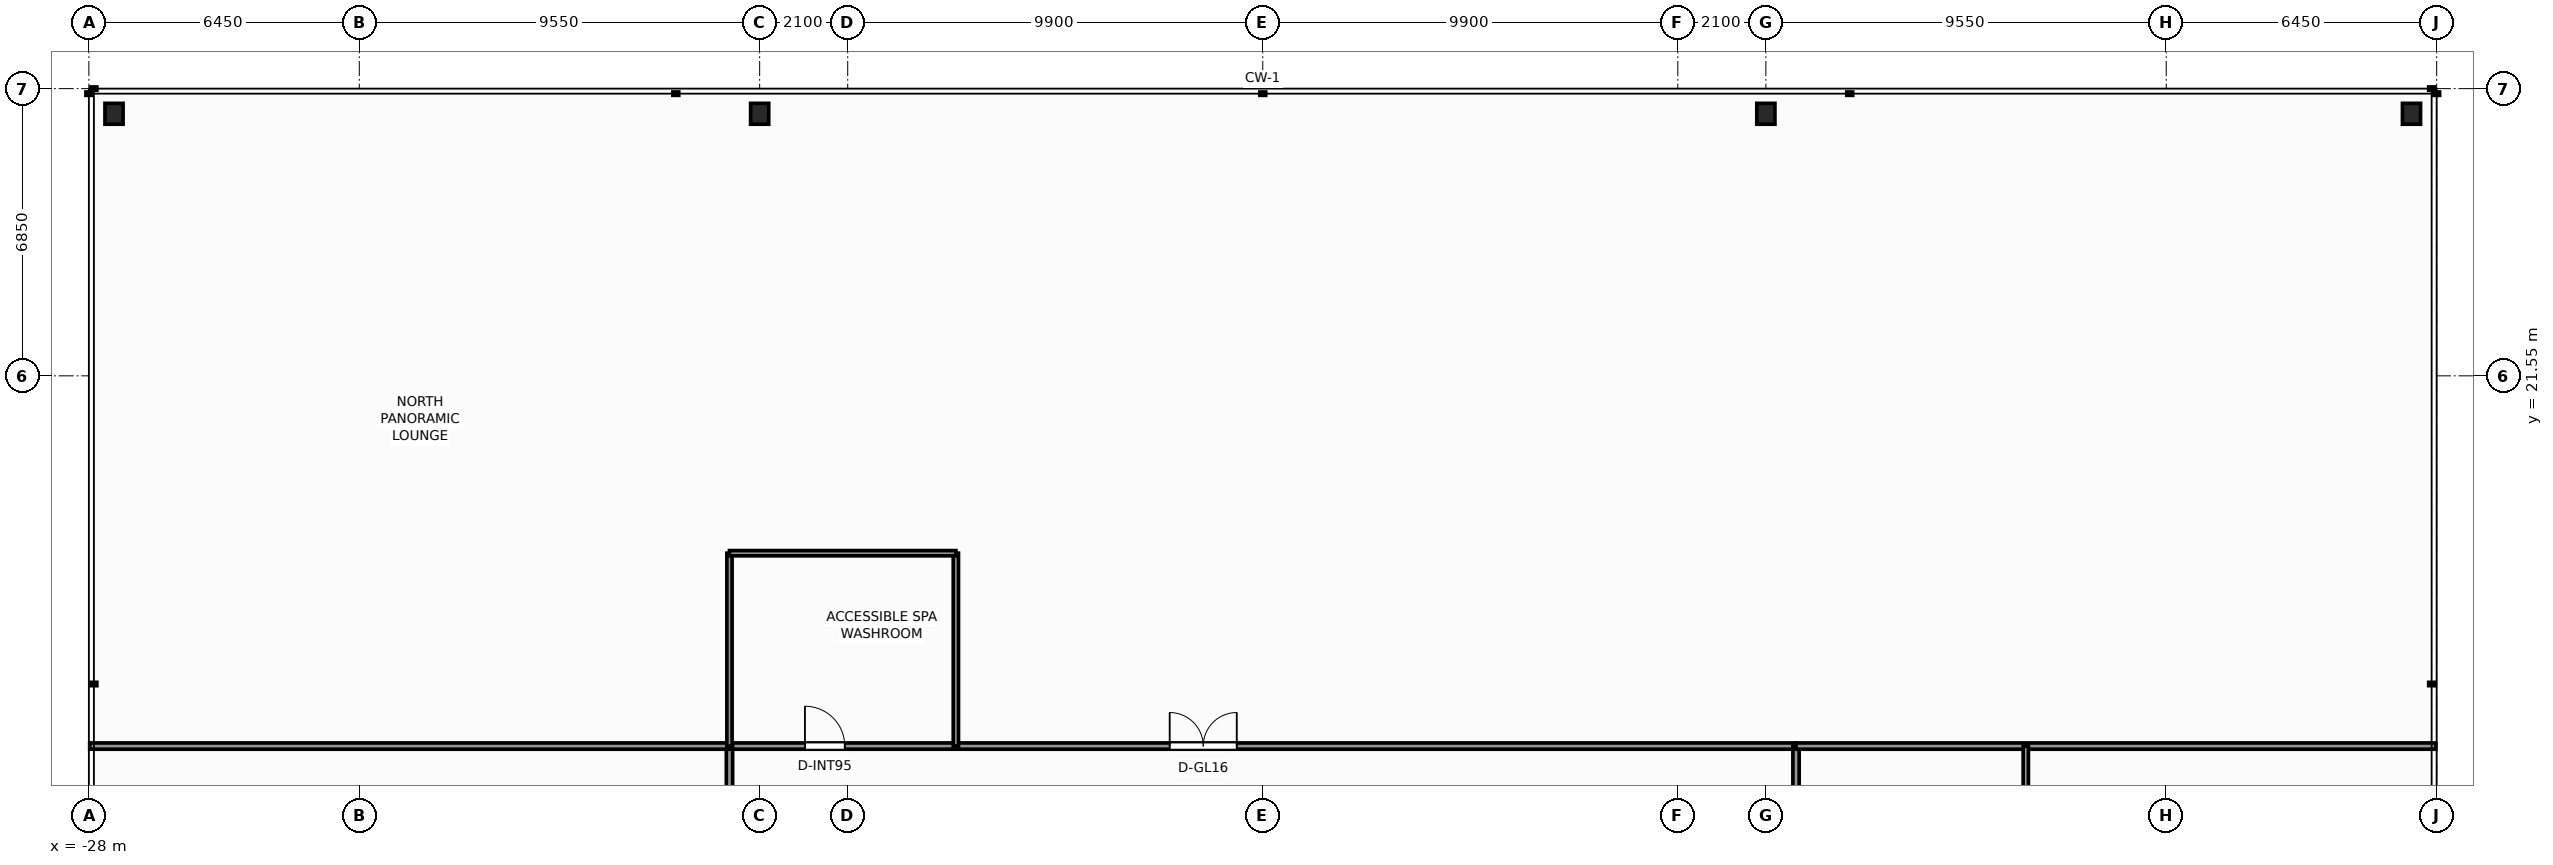
"""IFC4 building model, lengths in metres.
Left out: names, types, materials, properties, quantities, classifications, styles, units other than length and angle.
Written with IfcOpenShell. Run it as: python <this file> out.ifc"""

import sys

from ifc_helpers import new_model, si_unit, direction, frame, frame_2d, origin, origin_2d, place, context, subcontext, project, spatial, rectangle, i_section, extrude, element, fill, save


model = new_model("IFC4")
c1 = context("Model", 3, precision=1e-05, world=origin(), true_north=direction((0.0, 1.0)))
c2 = subcontext(c1, "Body", "Model", "MODEL_VIEW")
j1 = project(units=[si_unit("LENGTHUNIT", "METRE"), si_unit("PLANEANGLEUNIT", "RADIAN")], contexts=[c1])
p1 = place(None, origin())
s1 = spatial("IfcSite", under=j1, at=p1, CompositionType="ELEMENT")
p2 = place(p1, origin())
s2 = spatial("IfcBuilding", under=s1, at=p2, CompositionType="ELEMENT")
p3 = place(p2, frame((0.0, 0.0, 15.2)))
s3 = spatial("IfcBuildingStorey", under=s2, at=p3, CompositionType="ELEMENT", Elevation=15.2)
for number, where, z_axis, x_axis in (
    (1, (-27.4, 27.8, 0.0), (0.0, 0.0, 1.0), (1.0, 0.0, 0.0)),
    (2, (-12.0, 27.8, 0.0), (0.0, 0.0, 1.0), (1.0, 0.0, 0.0)),
    (3, (12.0, 27.8, 0.0), (0.0, 0.0, 1.0), (1.0, 0.0, 0.0)),
    (4, (27.4, 27.8, 0.0), (0.0, 0.0, 1.0), (1.0, 0.0, 0.0)),
):
    element("IfcColumn", number, at=place(p3, frame(where, z_axis=z_axis, x_axis=x_axis)), inside=s3, PredefinedType="COLUMN", context=c2, shape_type="SweptSolid", body=[
        extrude(i_section(OverallWidth=0.432, OverallDepth=0.498, WebThickness=0.056, FlangeThickness=0.089, FilletRadius=0.025, at=origin_2d()), origin(), (0.0, 0.0, 1.0), 4.1),
    ])
p4 = place(p3, frame((-12.72, 12.72, 0.0), z_axis=(0.0, 0.0, 1.0), x_axis=(1.0, 0.0, 0.0)))
e5 = element("IfcWall", 5, at=p4, inside=s3, PredefinedType="PARTITIONING", context=c2, shape_type="SweptSolid", body=[
    extrude(rectangle(XDim=25.44, YDim=0.15, at=frame_2d((12.72, 0.0))), origin(), (0.0, 0.0, 1.0), 2.674),
])
p5 = place(p4, frame((1.8, 0.0, 0.0)))
e6 = element("IfcOpeningElement", 6, at=p5, cuts=e5, PredefinedType="OPENING", context=c2, shape_type="SweptSolid", body=[
    extrude(rectangle(XDim=0.95, YDim=2.06, at=frame_2d((0.475, 1.03))), frame((0.0, 0.085, 0.0), z_axis=(0.0, -1.0, 0.0), x_axis=(1.0, 0.0, 0.0)), (0.0, 0.0, 1.0), 0.17),
])
p6 = place(p4, frame((10.5, 0.0, 0.0)))
e7 = element("IfcOpeningElement", 7, at=p6, cuts=e5, PredefinedType="OPENING", context=c2, shape_type="SweptSolid", body=[
    extrude(rectangle(XDim=1.6, YDim=2.3, at=frame_2d((0.8, 1.15))), frame((0.0, 0.085, 0.0), z_axis=(0.0, -1.0, 0.0), x_axis=(1.0, 0.0, 0.0)), (0.0, 0.0, 1.0), 0.17),
])
p7 = place(p3, frame((-12.72, 1.72, 0.0), z_axis=(0.0, 0.0, 1.0), x_axis=(0.0, 1.0, 0.0)))
e8 = element("IfcWall", 8, at=p7, inside=s3, PredefinedType="PARTITIONING", context=c2, shape_type="SweptSolid", body=[
    extrude(rectangle(XDim=11.0, YDim=0.15, at=frame_2d((5.5, 0.0))), origin(), (0.0, 0.0, 1.0), 2.674),
])
p8 = place(p7, frame((3.2, 0.0, 0.0)))
e9 = element("IfcOpeningElement", 9, at=p8, cuts=e8, PredefinedType="OPENING", context=c2, shape_type="SweptSolid", body=[
    extrude(rectangle(XDim=1.2, YDim=2.2, at=frame_2d((0.6, 1.1))), frame((0.0, 0.085, 0.0), z_axis=(0.0, -1.0, 0.0), x_axis=(1.0, 0.0, 0.0)), (0.0, 0.0, 1.0), 0.17),
])
p9 = place(p3, frame((12.72, 1.72, 0.0), z_axis=(0.0, 0.0, 1.0), x_axis=(0.0, 1.0, 0.0)))
e10 = element("IfcWall", 10, at=p9, inside=s3, PredefinedType="PARTITIONING", context=c2, shape_type="SweptSolid", body=[
    extrude(rectangle(XDim=11.0, YDim=0.15, at=frame_2d((5.5, 0.0))), origin(), (0.0, 0.0, 1.0), 2.674),
])
p10 = place(p9, frame((6.58, 0.0, 0.0)))
e11 = element("IfcOpeningElement", 11, at=p10, cuts=e10, PredefinedType="OPENING", context=c2, shape_type="SweptSolid", body=[
    extrude(rectangle(XDim=0.95, YDim=2.06, at=frame_2d((0.475, 1.03))), frame((0.0, 0.085, 0.0), z_axis=(0.0, -1.0, 0.0), x_axis=(1.0, 0.0, 0.0)), (0.0, 0.0, 1.0), 0.17),
])
p11 = place(p9, frame((1.8, 0.0, 0.0)))
e12 = element("IfcOpeningElement", 12, at=p11, cuts=e10, PredefinedType="OPENING", context=c2, shape_type="SweptSolid", body=[
    extrude(rectangle(XDim=0.95, YDim=2.06, at=frame_2d((0.475, 1.03))), frame((0.0, 0.085, 0.0), z_axis=(0.0, -1.0, 0.0), x_axis=(1.0, 0.0, 0.0)), (0.0, 0.0, 1.0), 0.17),
])
for number, where, z_axis, x_axis in (
    (13, (-27.98, 12.72, 0.0), (0.0, 0.0, 1.0), (1.0, 0.0, 0.0)),
    (14, (12.72, 12.72, 0.0), (0.0, 0.0, 1.0), (1.0, 0.0, 0.0)),
):
    element("IfcWall", number, at=place(p3, frame(where, z_axis=z_axis, x_axis=x_axis)), inside=s3, PredefinedType="PARTITIONING", context=c2, shape_type="SweptSolid", body=[
        extrude(rectangle(XDim=15.26, YDim=0.15, at=frame_2d((7.63, 0.0))), origin(), (0.0, 0.0, 1.0), 3.069),
    ])
p12 = place(p3, frame((18.2, 7.2, 0.0), z_axis=(0.0, 0.0, 1.0), x_axis=(0.0, 1.0, 0.0)))
e15 = element("IfcWall", 15, at=p12, inside=s3, PredefinedType="PARTITIONING", context=c2, shape_type="SweptSolid", body=[
    extrude(rectangle(XDim=5.52, YDim=0.125, at=frame_2d((2.76, 0.0))), origin(), (0.0, 0.0, 1.0), 2.674),
])
p13 = place(p12, frame((1.2, 0.0, 0.0)))
e16 = element("IfcOpeningElement", 16, at=p13, cuts=e15, PredefinedType="OPENING", context=c2, shape_type="SweptSolid", body=[
    extrude(rectangle(XDim=0.9, YDim=2.06, at=frame_2d((0.45, 1.03))), frame((0.0, 0.073, 0.0), z_axis=(0.0, -1.0, 0.0), x_axis=(1.0, 0.0, 0.0)), (0.0, 0.0, 1.0), 0.145),
])
for number, where, z_axis, x_axis in (
    (17, (-12.72, 12.72, 0.0), (0.0, 0.0, 1.0), (0.0, 1.0, 0.0)),
    (18, (-7.32, 12.72, 0.0), (0.0, 0.0, 1.0), (0.0, 1.0, 0.0)),
):
    element("IfcWall", number, at=place(p3, frame(where, z_axis=z_axis, x_axis=x_axis)), inside=s3, PredefinedType="PARTITIONING", context=c2, shape_type="SweptSolid", body=[
        extrude(rectangle(XDim=4.6, YDim=0.125, at=frame_2d((2.3, 0.0))), origin(), (0.0, 0.0, 1.0), 3.7),
    ])
p14 = place(p3, frame((-12.72, 17.32, 0.0), z_axis=(0.0, 0.0, 1.0), x_axis=(1.0, 0.0, 0.0)))
e19 = element("IfcWall", 19, at=p14, inside=s3, PredefinedType="PARTITIONING", context=c2, shape_type="SweptSolid", body=[
    extrude(rectangle(XDim=5.4, YDim=0.125, at=frame_2d((2.7, 0.0))), origin(), (0.0, 0.0, 1.0), 2.674),
])
p15 = place(p5, origin())
e20 = element("IfcDoor", 20, at=p15, inside=s3, OperationType="SINGLE_SWING_LEFT", PredefinedType="DOOR", context=c2, shape_type="SweptSolid", body=[
    extrude(rectangle(XDim=0.95, YDim=2.06, at=frame_2d((0.475, 1.03))), frame((0.0, 0.025, 0.0), z_axis=(0.0, -1.0, 0.0), x_axis=(1.0, 0.0, 0.0)), (0.0, 0.0, 1.0), 0.05),
])
fill(e6, e20)
p16 = place(p6, origin())
e21 = element("IfcDoor", 21, at=p16, inside=s3, OperationType="DOUBLE_DOOR_SINGLE_SWING", PredefinedType="DOOR", context=c2, shape_type="SweptSolid", body=[
    extrude(rectangle(XDim=1.6, YDim=2.3, at=frame_2d((0.8, 1.15))), frame((0.0, 0.025, 0.0), z_axis=(0.0, -1.0, 0.0), x_axis=(1.0, 0.0, 0.0)), (0.0, 0.0, 1.0), 0.05),
])
fill(e7, e21)
save(model, sys.argv[1])
